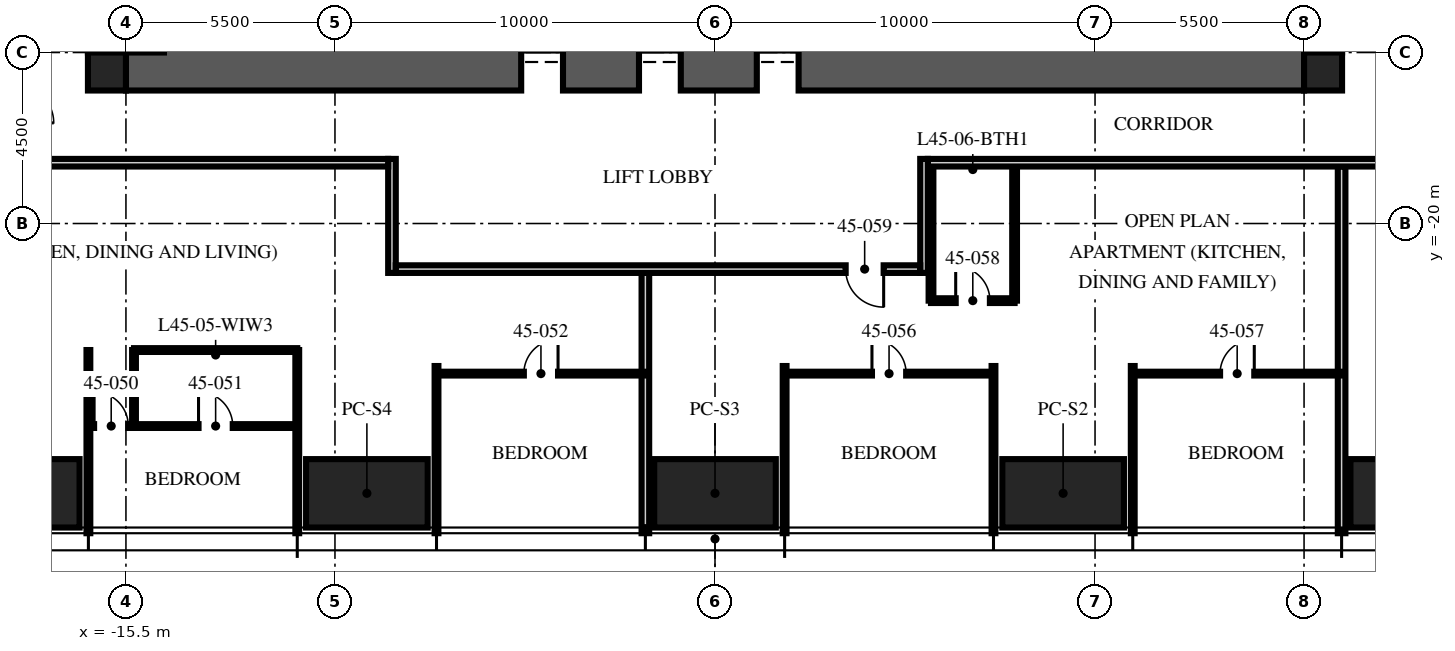
"""IFC4 building model, lengths in metres.
Left out: names, types, materials, properties, quantities, classifications, styles, units other than length and angle.
Written with IfcOpenShell. Run it as: python <this file> out.ifc"""

import sys

from ifc_helpers import new_model, si_unit, direction, frame, frame_2d, origin, origin_2d, place, context, subcontext, project, spatial, rectangle, hollow_rectangle, extrude, element, fill, save


model = new_model("IFC4")
c1 = context("Model", 3, precision=1e-05, world=origin(), true_north=direction((0.0, 1.0)))
c2 = subcontext(c1, "Body", "Model", "MODEL_VIEW")
j1 = project(units=[si_unit("LENGTHUNIT", "METRE"), si_unit("PLANEANGLEUNIT", "RADIAN")], contexts=[c1])
p1 = place(None, origin())
s1 = spatial("IfcSite", under=j1, at=p1, CompositionType="ELEMENT")
p2 = place(p1, origin())
s2 = spatial("IfcBuilding", under=s1, at=p2, CompositionType="ELEMENT")
p3 = place(p2, frame((0.0, 0.0, 178.5)))
s3 = spatial("IfcBuildingStorey", under=s2, at=p3, CompositionType="ELEMENT", Elevation=178.5)
p4 = place(p3, frame((-15.5, -15.5, -0.25), z_axis=(0.0, 0.0, 1.0), x_axis=(1.0, 0.0, 0.0)))
e1 = element("IfcWall", 1, at=p4, inside=s3, PredefinedType="SHEAR", context=c2, shape_type="SweptSolid", body=[
    extrude(rectangle(XDim=31.0, YDim=2.0, at=frame_2d((15.5, 0.0))), origin(), (0.0, 0.0, 1.0), 3.75),
])
p5 = place(p4, frame((10.4, 0.0, 0.25)))
e2 = element("IfcOpeningElement", 2, at=p5, cuts=e1, PredefinedType="OPENING", context=c2, shape_type="SweptSolid", body=[
    extrude(rectangle(XDim=1.1, YDim=2.1, at=frame_2d((0.55, 1.05))), frame((0.0, 1.01, 0.0), z_axis=(0.0, -1.0, 0.0), x_axis=(1.0, 0.0, 0.0)), (0.0, 0.0, 1.0), 2.02),
])
p6 = place(p4, frame((13.5, 0.0, 0.25)))
e3 = element("IfcOpeningElement", 3, at=p6, cuts=e1, PredefinedType="OPENING", context=c2, shape_type="SweptSolid", body=[
    extrude(rectangle(XDim=1.1, YDim=2.1, at=frame_2d((0.55, 1.05))), frame((0.0, 1.01, 0.0), z_axis=(0.0, -1.0, 0.0), x_axis=(1.0, 0.0, 0.0)), (0.0, 0.0, 1.0), 2.02),
])
p7 = place(p4, frame((16.6, 0.0, 0.25)))
e4 = element("IfcOpeningElement", 4, at=p7, cuts=e1, PredefinedType="OPENING", context=c2, shape_type="SweptSolid", body=[
    extrude(rectangle(XDim=1.1, YDim=2.1, at=frame_2d((0.55, 1.05))), frame((0.0, 1.01, 0.0), z_axis=(0.0, -1.0, 0.0), x_axis=(1.0, 0.0, 0.0)), (0.0, 0.0, 1.0), 2.02),
])
for number, where, z_axis, x_axis in (
    (5, (-16.0, -16.0, -0.25), (0.0, 0.0, 1.0), (1.0, 0.0, 0.0)),
    (6, (16.0, -16.0, -0.25), (0.0, 0.0, 1.0), (1.0, 0.0, 0.0)),
):
    element("IfcColumn", number, at=place(p3, frame(where, z_axis=z_axis, x_axis=x_axis)), inside=s3, PredefinedType="COLUMN", context=c2, shape_type="SweptSolid", body=[
        extrude(rectangle(XDim=1.0, YDim=1.0, at=origin_2d()), origin(), (0.0, 0.0, 1.0), 3.75),
    ])
for number, where, z_axis, x_axis in (
    (7, (18.32, -27.1, 0.0), (0.0, 0.0, 1.0), (1.0, 0.0, 0.0)),
    (8, (9.16, -27.1, 0.0), (0.0, 0.0, 1.0), (1.0, 0.0, 0.0)),
    (9, (0.0, -27.1, 0.0), (0.0, 0.0, 1.0), (1.0, 0.0, 0.0)),
    (10, (-9.16, -27.1, 0.0), (0.0, 0.0, 1.0), (1.0, 0.0, 0.0)),
    (11, (-18.32, -27.1, 0.0), (0.0, 0.0, 1.0), (1.0, 0.0, 0.0)),
):
    element("IfcColumn", number, at=place(p3, frame(where, z_axis=z_axis, x_axis=x_axis)), inside=s3, PredefinedType="COLUMN", context=c2, shape_type="SweptSolid", body=[
        extrude(hollow_rectangle(XDim=3.2, YDim=1.8, WallThickness=0.2, at=origin_2d()), origin(), (0.0, 0.0, 1.0), 3.75),
    ])
for number, where, z_axis, x_axis in (
    (12, (-16.488, -23.33, 0.0), (0.0, 0.0, 1.0), (0.0, -1.0, 0.0)),
    (13, (-10.992, -23.33, 0.0), (0.0, 0.0, 1.0), (0.0, -1.0, 0.0)),
):
    element("IfcWall", number, at=place(p3, frame(where, z_axis=z_axis, x_axis=x_axis)), inside=s3, PredefinedType="PARTITIONING", context=c2, shape_type="SweptSolid", body=[
        extrude(rectangle(XDim=4.82, YDim=0.1, at=frame_2d((2.41, 0.0))), origin(), (0.0, 0.0, 1.0), 2.81),
    ])
p8 = place(p3, frame((-7.328, -23.75, 0.0), z_axis=(0.0, 0.0, 1.0), x_axis=(0.0, -1.0, 0.0)))
e14 = element("IfcWall", 14, at=p8, inside=s3, PredefinedType="PARTITIONING", context=c2, shape_type="SweptSolid", body=[
    extrude(rectangle(XDim=4.4, YDim=0.1, at=frame_2d((2.2, 0.0))), origin(), (0.0, 0.0, 1.0), 2.81),
])
p9 = place(p3, frame((-1.832, -21.3, 0.0), z_axis=(0.0, 0.0, 1.0), x_axis=(0.0, -1.0, 0.0)))
e15 = element("IfcWall", 15, at=p9, inside=s3, PredefinedType="PARTITIONING", context=c2, shape_type="SweptSolid", body=[
    extrude(rectangle(XDim=6.85, YDim=0.2, at=frame_2d((3.425, 0.0))), origin(), (0.0, 0.0, 1.0), 2.81),
])
for number, where, z_axis, x_axis in (
    (16, (1.832, -23.75, 0.0), (0.0, 0.0, 1.0), (0.0, -1.0, 0.0)),
    (17, (7.328, -23.75, 0.0), (0.0, 0.0, 1.0), (0.0, -1.0, 0.0)),
    (18, (10.992, -23.75, 0.0), (0.0, 0.0, 1.0), (0.0, -1.0, 0.0)),
):
    element("IfcWall", number, at=place(p3, frame(where, z_axis=z_axis, x_axis=x_axis)), inside=s3, PredefinedType="PARTITIONING", context=c2, shape_type="SweptSolid", body=[
        extrude(rectangle(XDim=4.4, YDim=0.1, at=frame_2d((2.2, 0.0))), origin(), (0.0, 0.0, 1.0), 2.81),
    ])
p10 = place(p3, frame((16.488, -18.5, 0.0), z_axis=(0.0, 0.0, 1.0), x_axis=(0.0, -1.0, 0.0)))
e19 = element("IfcWall", 19, at=p10, inside=s3, PredefinedType="PARTITIONING", context=c2, shape_type="SweptSolid", body=[
    extrude(rectangle(XDim=9.65, YDim=0.2, at=frame_2d((4.825, 0.0))), origin(), (0.0, 0.0, 1.0), 2.81),
])
p11 = place(p3, frame((-16.488, -25.33, 0.0), z_axis=(0.0, 0.0, 1.0), x_axis=(1.0, 0.0, 0.0)))
e20 = element("IfcWall", 20, at=p11, inside=s3, PredefinedType="PARTITIONING", context=c2, shape_type="SweptSolid", body=[
    extrude(rectangle(XDim=5.496, YDim=0.1, at=frame_2d((2.748, 0.0))), origin(), (0.0, 0.0, 1.0), 2.81),
])
p12 = place(p11, frame((0.15, 0.0, 0.0)))
e21 = element("IfcOpeningElement", 21, at=p12, cuts=e20, PredefinedType="OPENING", context=c2, shape_type="SweptSolid", body=[
    extrude(rectangle(XDim=0.9, YDim=2.1, at=frame_2d((0.45, 1.05))), frame((0.0, 0.06, 0.0), z_axis=(0.0, -1.0, 0.0), x_axis=(1.0, 0.0, 0.0)), (0.0, 0.0, 1.0), 0.12),
])
p13 = place(p11, frame((2.898, 0.0, 0.0)))
e22 = element("IfcOpeningElement", 22, at=p13, cuts=e20, PredefinedType="OPENING", context=c2, shape_type="SweptSolid", body=[
    extrude(rectangle(XDim=0.9, YDim=2.1, at=frame_2d((0.45, 1.05))), frame((0.0, 0.06, 0.0), z_axis=(0.0, -1.0, 0.0), x_axis=(1.0, 0.0, 0.0)), (0.0, 0.0, 1.0), 0.12),
])
p14 = place(p3, frame((-15.288, -23.33, 0.0), z_axis=(0.0, 0.0, 1.0), x_axis=(0.0, -1.0, 0.0)))
e23 = element("IfcWall", 23, at=p14, inside=s3, PredefinedType="PARTITIONING", context=c2, shape_type="SweptSolid", body=[
    extrude(rectangle(XDim=2.0, YDim=0.1, at=frame_2d((1.0, 0.0))), origin(), (0.0, 0.0, 1.0), 3.5),
])
p15 = place(p3, frame((-15.288, -23.33, 0.0), z_axis=(0.0, 0.0, 1.0), x_axis=(1.0, 0.0, 0.0)))
e24 = element("IfcWall", 24, at=p15, inside=s3, PredefinedType="PARTITIONING", context=c2, shape_type="SweptSolid", body=[
    extrude(rectangle(XDim=4.296, YDim=0.1, at=frame_2d((2.148, 0.0))), origin(), (0.0, 0.0, 1.0), 2.81),
])
p16 = place(p3, frame((-7.328, -23.95, 0.0), z_axis=(0.0, 0.0, 1.0), x_axis=(1.0, 0.0, 0.0)))
e25 = element("IfcWall", 25, at=p16, inside=s3, PredefinedType="PARTITIONING", context=c2, shape_type="SweptSolid", body=[
    extrude(rectangle(XDim=5.496, YDim=0.1, at=frame_2d((2.748, 0.0))), origin(), (0.0, 0.0, 1.0), 2.81),
])
p17 = place(p16, frame((2.298, 0.0, 0.0)))
e26 = element("IfcOpeningElement", 26, at=p17, cuts=e25, PredefinedType="OPENING", context=c2, shape_type="SweptSolid", body=[
    extrude(rectangle(XDim=0.9, YDim=2.1, at=frame_2d((0.45, 1.05))), frame((0.0, 0.06, 0.0), z_axis=(0.0, -1.0, 0.0), x_axis=(1.0, 0.0, 0.0)), (0.0, 0.0, 1.0), 0.12),
])
p18 = place(p3, frame((1.832, -23.95, 0.0), z_axis=(0.0, 0.0, 1.0), x_axis=(1.0, 0.0, 0.0)))
e27 = element("IfcWall", 27, at=p18, inside=s3, PredefinedType="PARTITIONING", context=c2, shape_type="SweptSolid", body=[
    extrude(rectangle(XDim=5.496, YDim=0.1, at=frame_2d((2.748, 0.0))), origin(), (0.0, 0.0, 1.0), 2.81),
])
p19 = place(p18, frame((2.298, 0.0, 0.0)))
e28 = element("IfcOpeningElement", 28, at=p19, cuts=e27, PredefinedType="OPENING", context=c2, shape_type="SweptSolid", body=[
    extrude(rectangle(XDim=0.9, YDim=2.1, at=frame_2d((0.45, 1.05))), frame((0.0, 0.06, 0.0), z_axis=(0.0, -1.0, 0.0), x_axis=(1.0, 0.0, 0.0)), (0.0, 0.0, 1.0), 0.12),
])
p20 = place(p3, frame((10.992, -23.95, 0.0), z_axis=(0.0, 0.0, 1.0), x_axis=(1.0, 0.0, 0.0)))
e29 = element("IfcWall", 29, at=p20, inside=s3, PredefinedType="PARTITIONING", context=c2, shape_type="SweptSolid", body=[
    extrude(rectangle(XDim=5.496, YDim=0.1, at=frame_2d((2.748, 0.0))), origin(), (0.0, 0.0, 1.0), 2.81),
])
p21 = place(p20, frame((2.298, 0.0, 0.0)))
e30 = element("IfcOpeningElement", 30, at=p21, cuts=e29, PredefinedType="OPENING", context=c2, shape_type="SweptSolid", body=[
    extrude(rectangle(XDim=0.9, YDim=2.1, at=frame_2d((0.45, 1.05))), frame((0.0, 0.06, 0.0), z_axis=(0.0, -1.0, 0.0), x_axis=(1.0, 0.0, 0.0)), (0.0, 0.0, 1.0), 0.12),
])
p22 = place(p3, frame((5.684, -22.03, 0.0), z_axis=(0.0, 0.0, 1.0), x_axis=(1.0, 0.0, 0.0)))
e31 = element("IfcWall", 31, at=p22, inside=s3, PredefinedType="PARTITIONING", context=c2, shape_type="SweptSolid", body=[
    extrude(rectangle(XDim=2.2, YDim=0.125, at=frame_2d((1.1, 0.0))), origin(), (0.0, 0.0, 1.0), 3.5),
])
p23 = place(p22, frame((0.65, 0.0, 0.0)))
e32 = element("IfcOpeningElement", 32, at=p23, cuts=e31, PredefinedType="OPENING", context=c2, shape_type="SweptSolid", body=[
    extrude(rectangle(XDim=0.9, YDim=2.1, at=frame_2d((0.45, 1.05))), frame((0.0, 0.073, 0.0), z_axis=(0.0, -1.0, 0.0), x_axis=(1.0, 0.0, 0.0)), (0.0, 0.0, 1.0), 0.145),
])
for number, where, z_axis, x_axis in (
    (33, (5.684, -18.5, 0.0), (0.0, 0.0, 1.0), (0.0, -1.0, 0.0)),
    (34, (7.884, -18.5, 0.0), (0.0, 0.0, 1.0), (0.0, -1.0, 0.0)),
):
    element("IfcWall", number, at=place(p3, frame(where, z_axis=z_axis, x_axis=x_axis)), inside=s3, PredefinedType="PARTITIONING", context=c2, shape_type="SweptSolid", body=[
        extrude(rectangle(XDim=3.53, YDim=0.125, at=frame_2d((1.765, 0.0))), origin(), (0.0, 0.0, 1.0), 3.5),
    ])
p24 = place(p3, frame((18.5, -18.4, 0.0), z_axis=(0.0, 0.0, 1.0), x_axis=(-1.0, 0.0, 0.0)))
e35 = element("IfcWall", 35, at=p24, inside=s3, PredefinedType="PARTITIONING", context=c2, shape_type="SweptSolid", body=[
    extrude(rectangle(XDim=12.9, YDim=0.2, at=frame_2d((6.45, 0.0))), origin(), (0.0, 0.0, 1.0), 2.3),
])
for number, where, z_axis, x_axis in (
    (36, (5.5, -18.3, 0.0), (0.0, 0.0, 1.0), (0.0, -1.0, 0.0)),
    (37, (-8.5, -18.3, 0.0), (0.0, 0.0, 1.0), (0.0, -1.0, 0.0)),
):
    element("IfcWall", number, at=place(p3, frame(where, z_axis=z_axis, x_axis=x_axis)), inside=s3, PredefinedType="PARTITIONING", context=c2, shape_type="SweptSolid", body=[
        extrude(rectangle(XDim=3.0, YDim=0.2, at=frame_2d((1.5, 0.0))), origin(), (0.0, 0.0, 1.0), 3.5),
    ])
p25 = place(p3, frame((5.4, -21.2, 0.0), z_axis=(0.0, 0.0, 1.0), x_axis=(-1.0, 0.0, 0.0)))
e38 = element("IfcWall", 38, at=p25, inside=s3, PredefinedType="PARTITIONING", context=c2, shape_type="SweptSolid", body=[
    extrude(rectangle(XDim=13.8, YDim=0.2, at=frame_2d((6.9, 0.0))), origin(), (0.0, 0.0, 1.0), 2.7),
])
p26 = place(p25, frame((0.962, 0.0, 0.0)))
e39 = element("IfcOpeningElement", 39, at=p26, cuts=e38, PredefinedType="OPENING", context=c2, shape_type="SweptSolid", body=[
    extrude(rectangle(XDim=1.0, YDim=2.2, at=frame_2d((0.5, 1.1))), frame((0.0, 0.11, 0.0), z_axis=(0.0, -1.0, 0.0), x_axis=(1.0, 0.0, 0.0)), (0.0, 0.0, 1.0), 0.22),
])
p27 = place(p3, frame((-8.6, -18.4, 0.0), z_axis=(0.0, 0.0, 1.0), x_axis=(-1.0, 0.0, 0.0)))
e40 = element("IfcWall", 40, at=p27, inside=s3, PredefinedType="PARTITIONING", context=c2, shape_type="SweptSolid", body=[
    extrude(rectangle(XDim=9.9, YDim=0.2, at=frame_2d((4.95, 0.0))), origin(), (0.0, 0.0, 1.0), 2.3),
])
p28 = place(p5, origin())
e41 = element("IfcDoor", 41, at=p28, inside=s3, OperationType="DOUBLE_DOOR_SLIDING", PredefinedType="DOOR", context=c2, shape_type="SweptSolid", body=[
    extrude(rectangle(XDim=1.1, YDim=2.1, at=frame_2d((0.55, 1.05))), frame((0.0, 0.025, 0.0), z_axis=(0.0, -1.0, 0.0), x_axis=(1.0, 0.0, 0.0)), (0.0, 0.0, 1.0), 0.05),
])
fill(e2, e41)
p29 = place(p6, origin())
e42 = element("IfcDoor", 42, at=p29, inside=s3, OperationType="DOUBLE_DOOR_SLIDING", PredefinedType="DOOR", context=c2, shape_type="SweptSolid", body=[
    extrude(rectangle(XDim=1.1, YDim=2.1, at=frame_2d((0.55, 1.05))), frame((0.0, 0.025, 0.0), z_axis=(0.0, -1.0, 0.0), x_axis=(1.0, 0.0, 0.0)), (0.0, 0.0, 1.0), 0.05),
])
fill(e3, e42)
p30 = place(p7, origin())
e43 = element("IfcDoor", 43, at=p30, inside=s3, OperationType="DOUBLE_DOOR_SLIDING", PredefinedType="DOOR", context=c2, shape_type="SweptSolid", body=[
    extrude(rectangle(XDim=1.1, YDim=2.1, at=frame_2d((0.55, 1.05))), frame((0.0, 0.025, 0.0), z_axis=(0.0, -1.0, 0.0), x_axis=(1.0, 0.0, 0.0)), (0.0, 0.0, 1.0), 0.05),
])
fill(e4, e43)
p31 = place(p12, origin())
e44 = element("IfcDoor", 44, at=p31, inside=s3, OperationType="SINGLE_SWING_LEFT", PredefinedType="DOOR", context=c2, shape_type="SweptSolid", body=[
    extrude(rectangle(XDim=0.9, YDim=2.1, at=frame_2d((0.45, 1.05))), frame((0.0, 0.025, 0.0), z_axis=(0.0, -1.0, 0.0), x_axis=(1.0, 0.0, 0.0)), (0.0, 0.0, 1.0), 0.05),
])
fill(e21, e44)
p32 = place(p13, origin())
e45 = element("IfcDoor", 45, at=p32, inside=s3, OperationType="SINGLE_SWING_LEFT", PredefinedType="DOOR", context=c2, shape_type="SweptSolid", body=[
    extrude(rectangle(XDim=0.9, YDim=2.1, at=frame_2d((0.45, 1.05))), frame((0.0, 0.025, 0.0), z_axis=(0.0, -1.0, 0.0), x_axis=(1.0, 0.0, 0.0)), (0.0, 0.0, 1.0), 0.05),
])
fill(e22, e45)
p33 = place(p17, origin())
e46 = element("IfcDoor", 46, at=p33, inside=s3, OperationType="SINGLE_SWING_RIGHT", PredefinedType="DOOR", context=c2, shape_type="SweptSolid", body=[
    extrude(rectangle(XDim=0.9, YDim=2.1, at=frame_2d((0.45, 1.05))), frame((0.0, 0.025, 0.0), z_axis=(0.0, -1.0, 0.0), x_axis=(1.0, 0.0, 0.0)), (0.0, 0.0, 1.0), 0.05),
])
fill(e26, e46)
p34 = place(p19, origin())
e47 = element("IfcDoor", 47, at=p34, inside=s3, OperationType="SINGLE_SWING_LEFT", PredefinedType="DOOR", context=c2, shape_type="SweptSolid", body=[
    extrude(rectangle(XDim=0.9, YDim=2.1, at=frame_2d((0.45, 1.05))), frame((0.0, 0.025, 0.0), z_axis=(0.0, -1.0, 0.0), x_axis=(1.0, 0.0, 0.0)), (0.0, 0.0, 1.0), 0.05),
])
fill(e28, e47)
p35 = place(p21, origin())
e48 = element("IfcDoor", 48, at=p35, inside=s3, OperationType="SINGLE_SWING_RIGHT", PredefinedType="DOOR", context=c2, shape_type="SweptSolid", body=[
    extrude(rectangle(XDim=0.9, YDim=2.1, at=frame_2d((0.45, 1.05))), frame((0.0, 0.025, 0.0), z_axis=(0.0, -1.0, 0.0), x_axis=(1.0, 0.0, 0.0)), (0.0, 0.0, 1.0), 0.05),
])
fill(e30, e48)
p36 = place(p23, origin())
e49 = element("IfcDoor", 49, at=p36, inside=s3, OperationType="SINGLE_SWING_LEFT", PredefinedType="DOOR", context=c2, shape_type="SweptSolid", body=[
    extrude(rectangle(XDim=0.9, YDim=2.1, at=frame_2d((0.45, 1.05))), frame((0.0, 0.025, 0.0), z_axis=(0.0, -1.0, 0.0), x_axis=(1.0, 0.0, 0.0)), (0.0, 0.0, 1.0), 0.05),
])
fill(e32, e49)
p37 = place(p26, origin())
e50 = element("IfcDoor", 50, at=p37, inside=s3, OperationType="SINGLE_SWING_LEFT", PredefinedType="DOOR", context=c2, shape_type="SweptSolid", body=[
    extrude(rectangle(XDim=1.0, YDim=2.2, at=frame_2d((0.5, 1.1))), frame((0.0, 0.025, 0.0), z_axis=(0.0, -1.0, 0.0), x_axis=(1.0, 0.0, 0.0)), (0.0, 0.0, 1.0), 0.05),
])
fill(e39, e50)
save(model, sys.argv[1])
